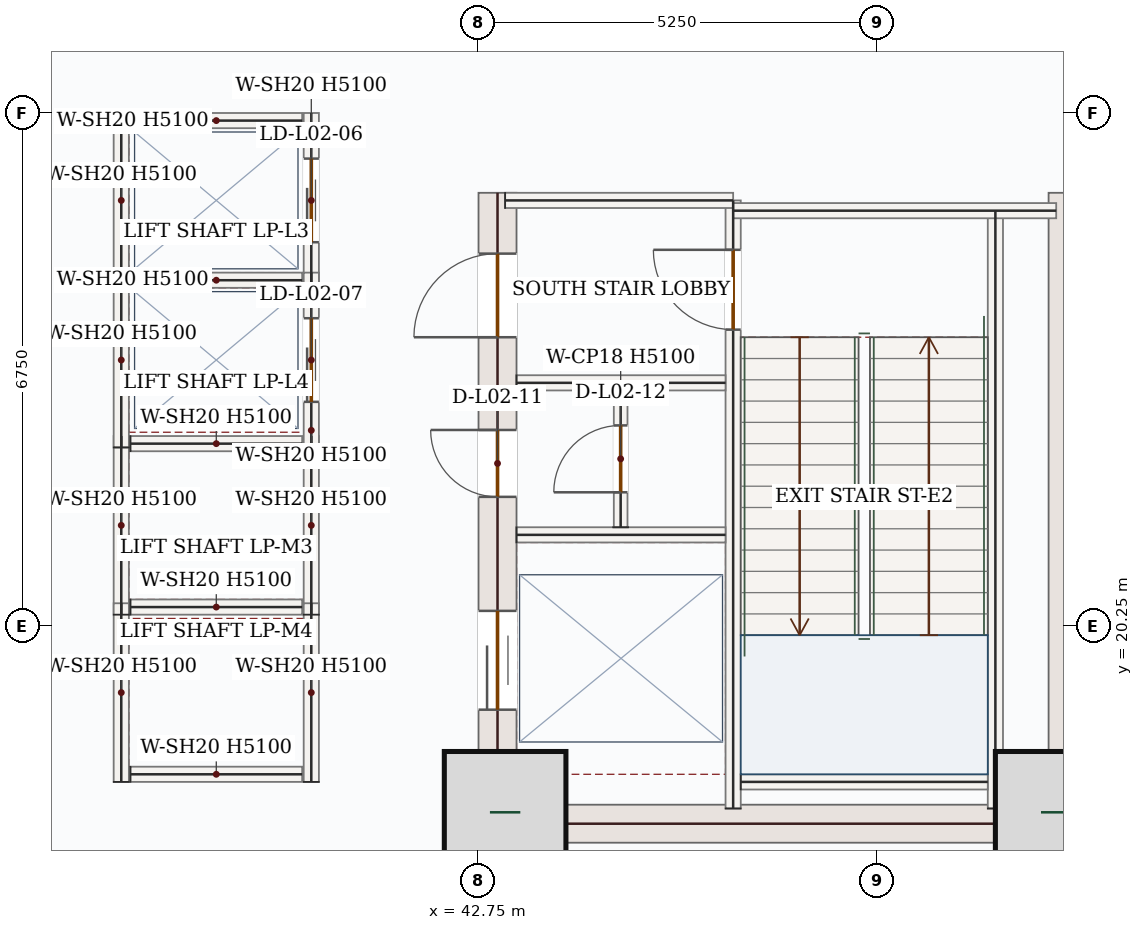
"""IFC4 building model, lengths in metres.
Left out: names, types, materials, properties, quantities, classifications, styles, units other than length and angle.
Written with IfcOpenShell. Run it as: python <this file> out.ifc"""

import sys

from ifc_helpers import new_model, si_unit, direction, frame, frame_2d, origin, origin_2d, place, context, subcontext, project, spatial, rectangle, extrude, source, transform, mapped, element, fill, save


model = new_model("IFC4")
c1 = context("Model", 3, precision=1e-05, world=origin(), true_north=direction((0.0, 1.0)))
c2 = subcontext(c1, "Body", "Model", "MODEL_VIEW")
j1 = project(units=[si_unit("LENGTHUNIT", "METRE"), si_unit("PLANEANGLEUNIT", "RADIAN")], contexts=[c1])
p1 = place(None, origin())
s1 = spatial("IfcSite", under=j1, at=p1, CompositionType="ELEMENT")
p2 = place(p1, origin())
s2 = spatial("IfcBuilding", under=s1, at=p2, CompositionType="ELEMENT")
p3 = place(p2, frame((0.0, 0.0, 12.6)))
s3 = spatial("IfcBuildingStorey", under=s2, at=p3, CompositionType="ELEMENT", Elevation=12.6)
p4 = place(p3, frame((43.0, 17.4, 0.0), z_axis=(0.0, 0.0, 1.0), x_axis=(0.0, 1.0, 0.0)))
e1 = element("IfcWall", 1, at=p4, inside=s3, PredefinedType="SHEAR", context=c2, shape_type="SweptSolid", body=[
    extrude(rectangle(XDim=8.55, YDim=0.5, at=frame_2d((4.275, 0.0))), origin(), (0.0, 0.0, 1.0), 5.1),
])
p5 = place(p4, frame((6.65, 0.0, 0.0)))
e2 = element("IfcOpeningElement", 2, at=p5, cuts=e1, PredefinedType="OPENING", context=c2, shape_type="SweptSolid", body=[
    extrude(rectangle(XDim=1.1, YDim=2.2, at=frame_2d((0.55, 1.1))), frame((0.0, 0.26, 0.0), z_axis=(0.0, -1.0, 0.0), x_axis=(1.0, 0.0, 0.0)), (0.0, 0.0, 1.0), 0.52),
])
p6 = place(p4, frame((1.75, 0.0, 0.0)))
e3 = element("IfcOpeningElement", 3, at=p6, cuts=e1, PredefinedType="OPENING", context=c2, shape_type="SweptSolid", body=[
    extrude(rectangle(XDim=1.3, YDim=2.2, at=frame_2d((0.65, 1.1))), frame((0.0, 0.26, 0.0), z_axis=(0.0, -1.0, 0.0), x_axis=(1.0, 0.0, 0.0)), (0.0, 0.0, 1.0), 0.52),
])
p7 = place(p4, frame((4.55, 0.0, 0.0)))
e4 = element("IfcOpeningElement", 4, at=p7, cuts=e1, PredefinedType="OPENING", context=c2, shape_type="SweptSolid", body=[
    extrude(rectangle(XDim=0.88, YDim=2.1, at=frame_2d((0.44, 1.05))), frame((0.0, 0.26, 0.0), z_axis=(0.0, -1.0, 0.0), x_axis=(1.0, 0.0, 0.0)), (0.0, 0.0, 1.0), 0.52),
])
m1 = source(origin(), c2, "Body", "SweptSolid", [
    extrude(rectangle(XDim=8.55, YDim=0.5, at=frame_2d((4.275, 0.0))), origin(), (0.0, 0.0, 1.0), 5.1),
])
p8 = place(p3, frame((50.5, 17.4, 0.0), z_axis=(0.0, 0.0, 1.0), x_axis=(0.0, 1.0, 0.0)))
e5 = element("IfcWall", 5, at=p8, inside=s3, PredefinedType="SHEAR", context=c2, shape_type="MappedRepresentation", body=[
    mapped(m1, transform((0.0, 0.0, 0.0), x_axis=(1.0, 0.0, 0.0), y_axis=(0.0, 1.0, 0.0), z_axis=(0.0, 0.0, 1.0), scale=1.0)),
])
m2 = source(origin(), c2, "Body", "SweptSolid", [
    extrude(rectangle(XDim=7.0, YDim=0.5, at=frame_2d((3.5, 0.0))), origin(), (0.0, 0.0, 1.0), 5.1),
])
p9 = place(p3, frame((43.25, 17.65, 0.0), z_axis=(0.0, 0.0, 1.0), x_axis=(1.0, 0.0, 0.0)))
e6 = element("IfcWall", 6, at=p9, inside=s3, PredefinedType="SHEAR", context=c2, shape_type="MappedRepresentation", body=[
    mapped(m2, transform((0.0, 0.0, 0.0), x_axis=(1.0, 0.0, 0.0), y_axis=(0.0, 1.0, 0.0), z_axis=(0.0, 0.0, 1.0), scale=1.0)),
])
m3 = source(origin(), c2, "Body", "SweptSolid", [
    extrude(rectangle(XDim=1.6, YDim=1.6, at=origin_2d()), origin(), (0.0, 0.0, 1.0), 5.4),
])
for number, where, z_axis, x_axis in (
    (7, (43.1, 17.8, 0.0), (0.0, 0.0, 1.0), (1.0, 0.0, 0.0)),
    (8, (50.35, 17.8, 0.0), (0.0, 0.0, 1.0), (1.0, 0.0, 0.0)),
):
    element("IfcColumn", number, at=place(p3, frame(where, z_axis=z_axis, x_axis=x_axis)), inside=s3, PredefinedType="COLUMN", context=c2, shape_type="MappedRepresentation", body=[
        mapped(m3, transform((0.0, 0.0, 0.0), x_axis=(1.0, 0.0, 0.0), y_axis=(0.0, 1.0, 0.0), z_axis=(0.0, 0.0, 1.0), scale=1.0)),
    ])
m4 = source(origin(), c2, "Body", "SweptSolid", [
    extrude(rectangle(XDim=7.87, YDim=0.2, at=frame_2d((3.935, 0.0))), origin(), (0.0, 0.0, 1.0), 5.1),
])
p10 = place(p3, frame((49.55, 17.85, 0.0), z_axis=(0.0, 0.0, 1.0), x_axis=(0.0, 1.0, 0.0)))
e9 = element("IfcWall", 9, at=p10, inside=s3, PredefinedType="SOLIDWALL", context=c2, shape_type="MappedRepresentation", body=[
    mapped(m4, transform((0.0, 0.0, 0.0), x_axis=(1.0, 0.0, 0.0), y_axis=(0.0, 1.0, 0.0), z_axis=(0.0, 0.0, 1.0), scale=1.0)),
])
p11 = place(p3, frame((46.1, 17.85, 0.0), z_axis=(0.0, 0.0, 1.0), x_axis=(0.0, 1.0, 0.0)))
e10 = element("IfcWall", 10, at=p11, inside=s3, PredefinedType="SOLIDWALL", context=c2, shape_type="SweptSolid", body=[
    extrude(rectangle(XDim=8.0, YDim=0.2, at=frame_2d((4.0, 0.0))), origin(), (0.0, 0.0, 1.0), 5.1),
])
p12 = place(p11, frame((6.3, 0.0, 0.0)))
e11 = element("IfcOpeningElement", 11, at=p12, cuts=e10, PredefinedType="OPENING", context=c2, shape_type="SweptSolid", body=[
    extrude(rectangle(XDim=1.05, YDim=2.15, at=frame_2d((0.525, 1.075))), frame((0.0, 0.11, 0.0), z_axis=(0.0, -1.0, 0.0), x_axis=(1.0, 0.0, 0.0)), (0.0, 0.0, 1.0), 0.22),
])
m5 = source(origin(), c2, "Body", "SweptSolid", [
    extrude(rectangle(XDim=3.0, YDim=0.2, at=frame_2d((1.5, 0.0))), origin(), (0.0, 0.0, 1.0), 5.1),
])
p13 = place(p3, frame((43.1, 25.85, 0.0), z_axis=(0.0, 0.0, 1.0), x_axis=(1.0, 0.0, 0.0)))
e12 = element("IfcWall", 12, at=p13, inside=s3, PredefinedType="SOLIDWALL", context=c2, shape_type="MappedRepresentation", body=[
    mapped(m5, transform((0.0, 0.0, 0.0), x_axis=(1.0, 0.0, 0.0), y_axis=(0.0, 1.0, 0.0), z_axis=(0.0, 0.0, 1.0), scale=1.0)),
])
m6 = source(origin(), c2, "Body", "SweptSolid", [
    extrude(rectangle(XDim=4.25, YDim=0.2, at=frame_2d((2.125, 0.0))), origin(), (0.0, 0.0, 1.0), 5.1),
])
p14 = place(p3, frame((46.1, 25.715, 0.0), z_axis=(0.0, 0.0, 1.0), x_axis=(1.0, 0.0, 0.0)))
e13 = element("IfcWall", 13, at=p14, inside=s3, PredefinedType="SOLIDWALL", context=c2, shape_type="MappedRepresentation", body=[
    mapped(m6, transform((0.0, 0.0, 0.0), x_axis=(1.0, 0.0, 0.0), y_axis=(0.0, 1.0, 0.0), z_axis=(0.0, 0.0, 1.0), scale=1.0)),
])
m7 = source(origin(), c2, "Body", "SweptSolid", [
    extrude(rectangle(XDim=3.25, YDim=0.2, at=frame_2d((1.625, 0.0))), origin(), (0.0, 0.0, 1.0), 5.1),
])
p15 = place(p3, frame((46.2, 18.2, 0.0), z_axis=(0.0, 0.0, 1.0), x_axis=(1.0, 0.0, 0.0)))
e14 = element("IfcWall", 14, at=p15, inside=s3, PredefinedType="SOLIDWALL", context=c2, shape_type="MappedRepresentation", body=[
    mapped(m7, transform((0.0, 0.0, 0.0), x_axis=(1.0, 0.0, 0.0), y_axis=(0.0, 1.0, 0.0), z_axis=(0.0, 0.0, 1.0), scale=1.0)),
])
m8 = source(origin(), c2, "Body", "SweptSolid", [
    extrude(rectangle(XDim=2.75, YDim=0.2, at=frame_2d((1.375, 0.0))), origin(), (0.0, 0.0, 1.0), 5.1),
])
for number, where, z_axis, x_axis in (
    (15, (43.25, 23.45, 0.0), (0.0, 0.0, 1.0), (1.0, 0.0, 0.0)),
    (16, (43.25, 21.45, 0.0), (0.0, 0.0, 1.0), (1.0, 0.0, 0.0)),
):
    element("IfcWall", number, at=place(p3, frame(where, z_axis=z_axis, x_axis=x_axis)), inside=s3, PredefinedType="SOLIDWALL", context=c2, shape_type="MappedRepresentation", body=[
        mapped(m8, transform((0.0, 0.0, 0.0), x_axis=(1.0, 0.0, 0.0), y_axis=(0.0, 1.0, 0.0), z_axis=(0.0, 0.0, 1.0), scale=1.0)),
    ])
p16 = place(p3, frame((44.62, 21.55, 0.0), z_axis=(0.0, 0.0, 1.0), x_axis=(0.0, 1.0, 0.0)))
e17 = element("IfcWall", 17, at=p16, inside=s3, PredefinedType="PARTITIONING", context=c2, shape_type="SweptSolid", body=[
    extrude(rectangle(XDim=1.8, YDim=0.18, at=frame_2d((0.9, 0.0))), origin(), (0.0, 0.0, 1.0), 5.1),
])
p17 = place(p16, frame((0.46, 0.0, 0.0)))
e18 = element("IfcOpeningElement", 18, at=p17, cuts=e17, PredefinedType="OPENING", context=c2, shape_type="SweptSolid", body=[
    extrude(rectangle(XDim=0.88, YDim=2.1, at=frame_2d((0.44, 1.05))), frame((0.0, 0.1, 0.0), z_axis=(0.0, -1.0, 0.0), x_axis=(1.0, 0.0, 0.0)), (0.0, 0.0, 1.0), 0.2),
])
m9 = source(origin(), c2, "Body", "SweptSolid", [
    extrude(rectangle(XDim=2.35, YDim=0.2, at=frame_2d((1.175, 0.0))), origin(), (0.0, 0.0, 1.0), 5.1),
])
for number, where, z_axis, x_axis in (
    (19, (38.05, 20.4, 0.0), (0.0, 0.0, 1.0), (0.0, 1.0, 0.0)),
    (20, (40.55, 20.4, 0.0), (0.0, 0.0, 1.0), (0.0, 1.0, 0.0)),
):
    element("IfcWall", number, at=place(p3, frame(where, z_axis=z_axis, x_axis=x_axis)), inside=s3, PredefinedType="SOLIDWALL", context=c2, shape_type="MappedRepresentation", body=[
        mapped(m9, transform((0.0, 0.0, 0.0), x_axis=(1.0, 0.0, 0.0), y_axis=(0.0, 1.0, 0.0), z_axis=(0.0, 0.0, 1.0), scale=1.0)),
    ])
m10 = source(origin(), c2, "Body", "SweptSolid", [
    extrude(rectangle(XDim=2.26, YDim=0.2, at=frame_2d((1.13, 0.0))), origin(), (0.0, 0.0, 1.0), 5.1),
])
for number, where, z_axis, x_axis in (
    (21, (38.17, 20.5, 0.0), (0.0, 0.0, 1.0), (1.0, 0.0, 0.0)),
    (22, (38.17, 22.65, 0.0), (0.0, 0.0, 1.0), (1.0, 0.0, 0.0)),
):
    element("IfcWall", number, at=place(p3, frame(where, z_axis=z_axis, x_axis=x_axis)), inside=s3, PredefinedType="SOLIDWALL", context=c2, shape_type="MappedRepresentation", body=[
        mapped(m10, transform((0.0, 0.0, 0.0), x_axis=(1.0, 0.0, 0.0), y_axis=(0.0, 1.0, 0.0), z_axis=(0.0, 0.0, 1.0), scale=1.0)),
    ])
for number, where, z_axis, x_axis in (
    (23, (38.05, 18.2, 0.0), (0.0, 0.0, 1.0), (0.0, 1.0, 0.0)),
    (24, (40.55, 18.2, 0.0), (0.0, 0.0, 1.0), (0.0, 1.0, 0.0)),
):
    element("IfcWall", number, at=place(p3, frame(where, z_axis=z_axis, x_axis=x_axis)), inside=s3, PredefinedType="SOLIDWALL", context=c2, shape_type="MappedRepresentation", body=[
        mapped(m9, transform((0.0, 0.0, 0.0), x_axis=(1.0, 0.0, 0.0), y_axis=(0.0, 1.0, 0.0), z_axis=(0.0, 0.0, 1.0), scale=1.0)),
    ])
p18 = place(p3, frame((38.17, 18.3, 0.0), z_axis=(0.0, 0.0, 1.0), x_axis=(1.0, 0.0, 0.0)))
e25 = element("IfcWall", 25, at=p18, inside=s3, PredefinedType="SOLIDWALL", context=c2, shape_type="MappedRepresentation", body=[
    mapped(m10, transform((0.0, 0.0, 0.0), x_axis=(1.0, 0.0, 0.0), y_axis=(0.0, 1.0, 0.0), z_axis=(0.0, 0.0, 1.0), scale=1.0)),
])
m11 = source(origin(), c2, "Body", "SweptSolid", [
    extrude(rectangle(XDim=2.3, YDim=0.2, at=frame_2d((1.15, 0.0))), origin(), (0.0, 0.0, 1.0), 5.1),
])
p19 = place(p3, frame((38.05, 24.7, 0.0), z_axis=(0.0, 0.0, 1.0), x_axis=(0.0, 1.0, 0.0)))
e26 = element("IfcWall", 26, at=p19, inside=s3, PredefinedType="SOLIDWALL", context=c2, shape_type="MappedRepresentation", body=[
    mapped(m11, transform((0.0, 0.0, 0.0), x_axis=(1.0, 0.0, 0.0), y_axis=(0.0, 1.0, 0.0), z_axis=(0.0, 0.0, 1.0), scale=1.0)),
])
p20 = place(p3, frame((40.55, 24.7, 0.0), z_axis=(0.0, 0.0, 1.0), x_axis=(0.0, 1.0, 0.0)))
e27 = element("IfcWall", 27, at=p20, inside=s3, PredefinedType="SOLIDWALL", context=c2, shape_type="SweptSolid", body=[
    extrude(rectangle(XDim=2.3, YDim=0.2, at=frame_2d((1.15, 0.0))), origin(), (0.0, 0.0, 1.0), 5.1),
])
p21 = place(p20, frame((0.6, 0.0, 0.0)))
e28 = element("IfcOpeningElement", 28, at=p21, cuts=e27, PredefinedType="OPENING", context=c2, shape_type="SweptSolid", body=[
    extrude(rectangle(XDim=1.1, YDim=2.15, at=frame_2d((0.55, 1.075))), frame((0.0, 0.11, 0.0), z_axis=(0.0, -1.0, 0.0), x_axis=(1.0, 0.0, 0.0)), (0.0, 0.0, 1.0), 0.22),
])
for number, where, z_axis, x_axis in (
    (29, (38.17, 24.8, 0.0), (0.0, 0.0, 1.0), (1.0, 0.0, 0.0)),
    (30, (38.17, 26.9, 0.0), (0.0, 0.0, 1.0), (1.0, 0.0, 0.0)),
):
    element("IfcWall", number, at=place(p3, frame(where, z_axis=z_axis, x_axis=x_axis)), inside=s3, PredefinedType="SOLIDWALL", context=c2, shape_type="MappedRepresentation", body=[
        mapped(m10, transform((0.0, 0.0, 0.0), x_axis=(1.0, 0.0, 0.0), y_axis=(0.0, 1.0, 0.0), z_axis=(0.0, 0.0, 1.0), scale=1.0)),
    ])
m12 = source(origin(), c2, "Body", "SweptSolid", [
    extrude(rectangle(XDim=2.3, YDim=0.2, at=frame_2d((1.15, 0.0))), origin(), (0.0, 0.0, 1.0), 5.1),
])
p22 = place(p3, frame((38.05, 22.6, 0.0), z_axis=(0.0, 0.0, 1.0), x_axis=(0.0, 1.0, 0.0)))
e31 = element("IfcWall", 31, at=p22, inside=s3, PredefinedType="SOLIDWALL", context=c2, shape_type="MappedRepresentation", body=[
    mapped(m12, transform((0.0, 0.0, 0.0), x_axis=(1.0, 0.0, 0.0), y_axis=(0.0, 1.0, 0.0), z_axis=(0.0, 0.0, 1.0), scale=1.0)),
])
p23 = place(p3, frame((40.55, 22.6, 0.0), z_axis=(0.0, 0.0, 1.0), x_axis=(0.0, 1.0, 0.0)))
e32 = element("IfcWall", 32, at=p23, inside=s3, PredefinedType="SOLIDWALL", context=c2, shape_type="SweptSolid", body=[
    extrude(rectangle(XDim=2.3, YDim=0.2, at=frame_2d((1.15, 0.0))), origin(), (0.0, 0.0, 1.0), 5.1),
])
p24 = place(p23, frame((0.6, 0.0, 0.0)))
e33 = element("IfcOpeningElement", 33, at=p24, cuts=e32, PredefinedType="OPENING", context=c2, shape_type="SweptSolid", body=[
    extrude(rectangle(XDim=1.1, YDim=2.15, at=frame_2d((0.55, 1.075))), frame((0.0, 0.11, 0.0), z_axis=(0.0, -1.0, 0.0), x_axis=(1.0, 0.0, 0.0)), (0.0, 0.0, 1.0), 0.22),
])
m13 = source(origin(), c2, "Body", "SweptSolid", [
    extrude(rectangle(XDim=1.05, YDim=2.15, at=frame_2d((0.525, 1.075))), frame((0.0, 0.025, 0.0), z_axis=(0.0, -1.0, 0.0), x_axis=(1.0, 0.0, 0.0)), (0.0, 0.0, 1.0), 0.05),
])
p25 = place(p12, origin())
e34 = element("IfcDoor", 34, at=p25, inside=s3, OperationType="SINGLE_SWING_RIGHT", PredefinedType="DOOR", context=c2, shape_type="MappedRepresentation", body=[
    mapped(m13, transform((0.0, 0.0, 0.0), x_axis=(1.0, 0.0, 0.0), y_axis=(0.0, 1.0, 0.0), z_axis=(0.0, 0.0, 1.0), scale=1.0)),
])
fill(e11, e34)
m14 = source(origin(), c2, "Body", "SweptSolid", [
    extrude(rectangle(XDim=1.1, YDim=2.2, at=frame_2d((0.55, 1.1))), frame((0.0, 0.025, 0.0), z_axis=(0.0, -1.0, 0.0), x_axis=(1.0, 0.0, 0.0)), (0.0, 0.0, 1.0), 0.05),
])
p26 = place(p5, origin())
e35 = element("IfcDoor", 35, at=p26, inside=s3, OperationType="SINGLE_SWING_LEFT", PredefinedType="DOOR", context=c2, shape_type="MappedRepresentation", body=[
    mapped(m14, transform((0.0, 0.0, 0.0), x_axis=(1.0, 0.0, 0.0), y_axis=(0.0, 1.0, 0.0), z_axis=(0.0, 0.0, 1.0), scale=1.0)),
])
fill(e2, e35)
m15 = source(origin(), c2, "Body", "SweptSolid", [
    extrude(rectangle(XDim=1.3, YDim=2.2, at=frame_2d((0.65, 1.1))), frame((0.0, 0.025, 0.0), z_axis=(0.0, -1.0, 0.0), x_axis=(1.0, 0.0, 0.0)), (0.0, 0.0, 1.0), 0.05),
])
p27 = place(p6, origin())
e36 = element("IfcDoor", 36, at=p27, inside=s3, OperationType="DOUBLE_DOOR_SLIDING", PredefinedType="DOOR", context=c2, shape_type="MappedRepresentation", body=[
    mapped(m15, transform((0.0, 0.0, 0.0), x_axis=(1.0, 0.0, 0.0), y_axis=(0.0, 1.0, 0.0), z_axis=(0.0, 0.0, 1.0), scale=1.0)),
])
fill(e3, e36)
m16 = source(origin(), c2, "Body", "SweptSolid", [
    extrude(rectangle(XDim=0.88, YDim=2.1, at=frame_2d((0.44, 1.05))), frame((0.0, 0.025, 0.0), z_axis=(0.0, -1.0, 0.0), x_axis=(1.0, 0.0, 0.0)), (0.0, 0.0, 1.0), 0.05),
])
p28 = place(p7, origin())
e37 = element("IfcDoor", 37, at=p28, inside=s3, OperationType="SINGLE_SWING_RIGHT", PredefinedType="DOOR", context=c2, shape_type="MappedRepresentation", body=[
    mapped(m16, transform((0.0, 0.0, 0.0), x_axis=(1.0, 0.0, 0.0), y_axis=(0.0, 1.0, 0.0), z_axis=(0.0, 0.0, 1.0), scale=1.0)),
])
fill(e4, e37)
p29 = place(p17, origin())
e38 = element("IfcDoor", 38, at=p29, inside=s3, OperationType="SINGLE_SWING_LEFT", PredefinedType="DOOR", context=c2, shape_type="MappedRepresentation", body=[
    mapped(m16, transform((0.0, 0.0, 0.0), x_axis=(1.0, 0.0, 0.0), y_axis=(0.0, 1.0, 0.0), z_axis=(0.0, 0.0, 1.0), scale=1.0)),
])
fill(e18, e38)
m17 = source(origin(), c2, "Body", "SweptSolid", [
    extrude(rectangle(XDim=1.1, YDim=2.15, at=frame_2d((0.55, 1.075))), frame((0.0, 0.025, 0.0), z_axis=(0.0, -1.0, 0.0), x_axis=(1.0, 0.0, 0.0)), (0.0, 0.0, 1.0), 0.05),
])
p30 = place(p21, origin())
e39 = element("IfcDoor", 39, at=p30, inside=s3, OperationType="DOUBLE_DOOR_SLIDING", PredefinedType="DOOR", context=c2, shape_type="MappedRepresentation", body=[
    mapped(m17, transform((0.0, 0.0, 0.0), x_axis=(1.0, 0.0, 0.0), y_axis=(0.0, 1.0, 0.0), z_axis=(0.0, 0.0, 1.0), scale=1.0)),
])
fill(e28, e39)
p31 = place(p24, origin())
e40 = element("IfcDoor", 40, at=p31, inside=s3, OperationType="DOUBLE_DOOR_SLIDING", PredefinedType="DOOR", context=c2, shape_type="MappedRepresentation", body=[
    mapped(m17, transform((0.0, 0.0, 0.0), x_axis=(1.0, 0.0, 0.0), y_axis=(0.0, 1.0, 0.0), z_axis=(0.0, 0.0, 1.0), scale=1.0)),
])
fill(e33, e40)
save(model, sys.argv[1])
